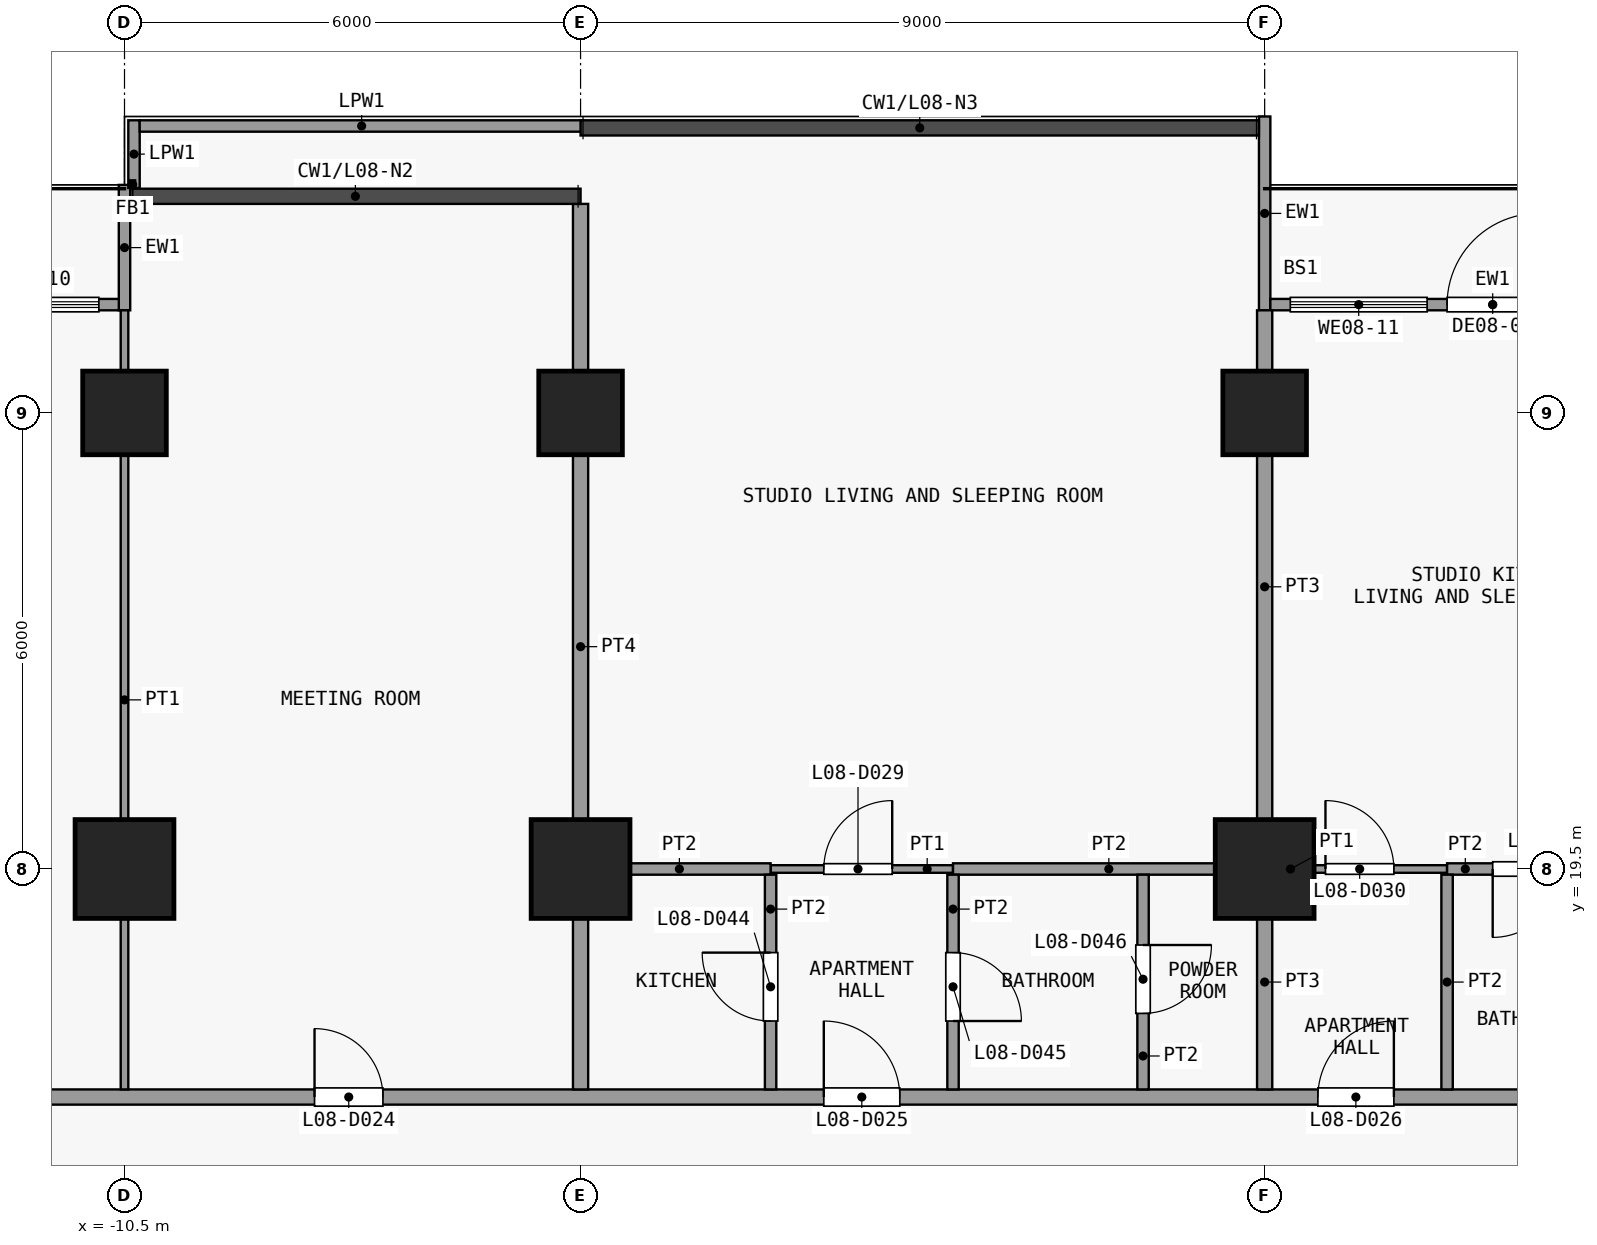
"""IFC4 building model, lengths in metres.
Left out: names, types, materials, properties, quantities, classifications, styles, units other than length and angle.
Written with IfcOpenShell. Run it as: python <this file> out.ifc"""

import sys

from ifc_helpers import new_model, si_unit, direction, frame, frame_2d, origin, origin_2d, place, context, subcontext, project, spatial, rectangle, extrude, element, fill, save


model = new_model("IFC4")
c1 = context("Model", 3, precision=1e-05, world=origin(), true_north=direction((0.0, 1.0)))
c2 = subcontext(c1, "Body", "Model", "MODEL_VIEW")
j1 = project(units=[si_unit("LENGTHUNIT", "METRE"), si_unit("PLANEANGLEUNIT", "RADIAN")], contexts=[c1])
p1 = place(None, origin())
s1 = spatial("IfcSite", under=j1, at=p1, CompositionType="ELEMENT")
p2 = place(p1, origin())
s2 = spatial("IfcBuilding", under=s1, at=p2, CompositionType="ELEMENT")
p3 = place(p2, frame((0.0, 0.0, 39.7)))
s3 = spatial("IfcBuildingStorey", under=s2, at=p3, CompositionType="ELEMENT", Elevation=39.7)
p4 = place(p3, frame((-10.5, 19.5, 0.0), z_axis=(0.0, 0.0, 1.0), x_axis=(1.0, 0.0, 0.0)))
e1 = element("IfcColumn", 1, at=p4, inside=s3, PredefinedType="COLUMN", context=c2, shape_type="SweptSolid", body=[
    extrude(rectangle(XDim=1.3, YDim=1.3, at=origin_2d()), origin(), (0.0, 0.0, 1.0), 3.6),
])
p5 = place(p3, frame((-10.5, 25.5, 0.0), z_axis=(0.0, 0.0, 1.0), x_axis=(1.0, 0.0, 0.0)))
e2 = element("IfcColumn", 2, at=p5, inside=s3, PredefinedType="COLUMN", context=c2, shape_type="SweptSolid", body=[
    extrude(rectangle(XDim=1.1, YDim=1.1, at=origin_2d()), origin(), (0.0, 0.0, 1.0), 3.6),
])
p6 = place(p3, frame((-4.5, 19.5, 0.0), z_axis=(0.0, 0.0, 1.0), x_axis=(1.0, 0.0, 0.0)))
e3 = element("IfcColumn", 3, at=p6, inside=s3, PredefinedType="COLUMN", context=c2, shape_type="SweptSolid", body=[
    extrude(rectangle(XDim=1.3, YDim=1.3, at=origin_2d()), origin(), (0.0, 0.0, 1.0), 3.6),
])
p7 = place(p3, frame((-4.5, 25.5, 0.0), z_axis=(0.0, 0.0, 1.0), x_axis=(1.0, 0.0, 0.0)))
e4 = element("IfcColumn", 4, at=p7, inside=s3, PredefinedType="COLUMN", context=c2, shape_type="SweptSolid", body=[
    extrude(rectangle(XDim=1.1, YDim=1.1, at=origin_2d()), origin(), (0.0, 0.0, 1.0), 3.6),
])
p8 = place(p3, frame((4.5, 19.5, 0.0), z_axis=(0.0, 0.0, 1.0), x_axis=(1.0, 0.0, 0.0)))
e5 = element("IfcColumn", 5, at=p8, inside=s3, PredefinedType="COLUMN", context=c2, shape_type="SweptSolid", body=[
    extrude(rectangle(XDim=1.3, YDim=1.3, at=origin_2d()), origin(), (0.0, 0.0, 1.0), 3.6),
])
p9 = place(p3, frame((4.5, 25.5, 0.0), z_axis=(0.0, 0.0, 1.0), x_axis=(1.0, 0.0, 0.0)))
e6 = element("IfcColumn", 6, at=p9, inside=s3, PredefinedType="COLUMN", context=c2, shape_type="SweptSolid", body=[
    extrude(rectangle(XDim=1.1, YDim=1.1, at=origin_2d()), origin(), (0.0, 0.0, 1.0), 3.6),
])
p10 = place(p3, frame((-10.5, 26.85, 0.0), z_axis=(0.0, 0.0, 1.0), x_axis=(0.0, 1.0, 0.0)))
e7 = element("IfcWall", 7, at=p10, inside=s3, PredefinedType="SOLIDWALL", context=c2, shape_type="SweptSolid", body=[
    extrude(rectangle(XDim=1.65, YDim=0.15, at=frame_2d((0.825, 0.0))), origin(), (0.0, 0.0, 1.0), 3.3),
])
p11 = place(p3, frame((-16.425, 26.925, 0.0), z_axis=(0.0, 0.0, 1.0), x_axis=(1.0, 0.0, 0.0)))
e8 = element("IfcWall", 8, at=p11, inside=s3, PredefinedType="SOLIDWALL", context=c2, shape_type="SweptSolid", body=[
    extrude(rectangle(XDim=5.85, YDim=0.15, at=frame_2d((2.925, 0.0))), origin(), (0.0, 0.0, 1.0), 3.3),
])
p12 = place(p11, frame((2.325, 0.0, 0.0)))
e9 = element("IfcOpeningElement", 9, at=p12, cuts=e8, PredefinedType="OPENING", context=c2, shape_type="SweptSolid", body=[
    extrude(rectangle(XDim=1.2, YDim=2.4, at=frame_2d((0.6, 1.2))), frame((0.0, 0.085, 0.0), z_axis=(0.0, -1.0, 0.0), x_axis=(1.0, 0.0, 0.0)), (0.0, 0.0, 1.0), 0.17),
])
p13 = place(p11, frame((0.262, 0.0, 0.9)))
e10 = element("IfcOpeningElement", 10, at=p13, cuts=e8, PredefinedType="OPENING", context=c2, shape_type="SweptSolid", body=[
    extrude(rectangle(XDim=1.8, YDim=2.1, at=frame_2d((0.9, 1.05))), frame((0.0, 0.085, 0.0), z_axis=(0.0, -1.0, 0.0), x_axis=(1.0, 0.0, 0.0)), (0.0, 0.0, 1.0), 0.17),
])
p14 = place(p11, frame((3.788, 0.0, 0.9)))
e11 = element("IfcOpeningElement", 11, at=p14, cuts=e8, PredefinedType="OPENING", context=c2, shape_type="SweptSolid", body=[
    extrude(rectangle(XDim=1.8, YDim=2.1, at=frame_2d((0.9, 1.05))), frame((0.0, 0.085, 0.0), z_axis=(0.0, -1.0, 0.0), x_axis=(1.0, 0.0, 0.0)), (0.0, 0.0, 1.0), 0.17),
])
p15 = place(p3, frame((4.5, 26.85, 0.0), z_axis=(0.0, 0.0, 1.0), x_axis=(0.0, 1.0, 0.0)))
e12 = element("IfcWall", 12, at=p15, inside=s3, PredefinedType="SOLIDWALL", context=c2, shape_type="SweptSolid", body=[
    extrude(rectangle(XDim=2.55, YDim=0.15, at=frame_2d((1.275, 0.0))), origin(), (0.0, 0.0, 1.0), 3.3),
])
p16 = place(p3, frame((4.575, 26.925, 0.0), z_axis=(0.0, 0.0, 1.0), x_axis=(1.0, 0.0, 0.0)))
e13 = element("IfcWall", 13, at=p16, inside=s3, PredefinedType="SOLIDWALL", context=c2, shape_type="SweptSolid", body=[
    extrude(rectangle(XDim=5.85, YDim=0.15, at=frame_2d((2.925, 0.0))), origin(), (0.0, 0.0, 1.0), 3.3),
])
p17 = place(p16, frame((2.325, 0.0, 0.0)))
e14 = element("IfcOpeningElement", 14, at=p17, cuts=e13, PredefinedType="OPENING", context=c2, shape_type="SweptSolid", body=[
    extrude(rectangle(XDim=1.2, YDim=2.4, at=frame_2d((0.6, 1.2))), frame((0.0, 0.085, 0.0), z_axis=(0.0, -1.0, 0.0), x_axis=(1.0, 0.0, 0.0)), (0.0, 0.0, 1.0), 0.17),
])
p18 = place(p16, frame((0.262, 0.0, 0.9)))
e15 = element("IfcOpeningElement", 15, at=p18, cuts=e13, PredefinedType="OPENING", context=c2, shape_type="SweptSolid", body=[
    extrude(rectangle(XDim=1.8, YDim=2.1, at=frame_2d((0.9, 1.05))), frame((0.0, 0.085, 0.0), z_axis=(0.0, -1.0, 0.0), x_axis=(1.0, 0.0, 0.0)), (0.0, 0.0, 1.0), 0.17),
])
p19 = place(p16, frame((3.788, 0.0, 0.9)))
e16 = element("IfcOpeningElement", 16, at=p19, cuts=e13, PredefinedType="OPENING", context=c2, shape_type="SweptSolid", body=[
    extrude(rectangle(XDim=1.8, YDim=2.1, at=frame_2d((0.9, 1.05))), frame((0.0, 0.085, 0.0), z_axis=(0.0, -1.0, 0.0), x_axis=(1.0, 0.0, 0.0)), (0.0, 0.0, 1.0), 0.17),
])
p20 = place(p3, frame((-10.375, 28.46, 0.0), z_axis=(0.0, 0.0, 1.0), x_axis=(0.0, 1.0, 0.0)))
e17 = element("IfcWall", 17, at=p20, inside=s3, PredefinedType="PARAPET", context=c2, shape_type="SweptSolid", body=[
    extrude(rectangle(XDim=0.89, YDim=0.15, at=frame_2d((0.445, 0.0))), origin(), (0.0, 0.0, 1.0), 1.15),
])
p21 = place(p3, frame((-10.3, 29.275, 0.0), z_axis=(0.0, 0.0, 1.0), x_axis=(1.0, 0.0, 0.0)))
e18 = element("IfcWall", 18, at=p21, inside=s3, PredefinedType="PARAPET", context=c2, shape_type="SweptSolid", body=[
    extrude(rectangle(XDim=5.84, YDim=0.15, at=frame_2d((2.92, 0.0))), origin(), (0.0, 0.0, 1.0), 1.15),
])
p22 = place(p3, frame((-25.35, 16.5, 0.0), z_axis=(0.0, 0.0, 1.0), x_axis=(1.0, 0.0, 0.0)))
e19 = element("IfcWall", 19, at=p22, inside=s3, PredefinedType="PARTITIONING", context=c2, shape_type="SweptSolid", body=[
    extrude(rectangle(XDim=50.7, YDim=0.2, at=frame_2d((25.35, 0.0))), origin(), (0.0, 0.0, 1.0), 3.3),
])
p23 = place(p22, frame((4.55, 0.0, 0.0)))
e20 = element("IfcOpeningElement", 20, at=p23, cuts=e19, PredefinedType="OPENING", context=c2, shape_type="SweptSolid", body=[
    extrude(rectangle(XDim=1.0, YDim=2.1, at=frame_2d((0.5, 1.05))), frame((0.0, 0.11, 0.0), z_axis=(0.0, -1.0, 0.0), x_axis=(1.0, 0.0, 0.0)), (0.0, 0.0, 1.0), 0.22),
])
p24 = place(p22, frame((11.35, 0.0, 0.0)))
e21 = element("IfcOpeningElement", 21, at=p24, cuts=e19, PredefinedType="OPENING", context=c2, shape_type="SweptSolid", body=[
    extrude(rectangle(XDim=0.9, YDim=2.1, at=frame_2d((0.45, 1.05))), frame((0.0, 0.11, 0.0), z_axis=(0.0, -1.0, 0.0), x_axis=(1.0, 0.0, 0.0)), (0.0, 0.0, 1.0), 0.22),
])
p25 = place(p22, frame((17.35, 0.0, 0.0)))
e22 = element("IfcOpeningElement", 22, at=p25, cuts=e19, PredefinedType="OPENING", context=c2, shape_type="SweptSolid", body=[
    extrude(rectangle(XDim=0.9, YDim=2.1, at=frame_2d((0.45, 1.05))), frame((0.0, 0.11, 0.0), z_axis=(0.0, -1.0, 0.0), x_axis=(1.0, 0.0, 0.0)), (0.0, 0.0, 1.0), 0.22),
])
p26 = place(p22, frame((24.05, 0.0, 0.0)))
e23 = element("IfcOpeningElement", 23, at=p26, cuts=e19, PredefinedType="OPENING", context=c2, shape_type="SweptSolid", body=[
    extrude(rectangle(XDim=1.0, YDim=2.1, at=frame_2d((0.5, 1.05))), frame((0.0, 0.11, 0.0), z_axis=(0.0, -1.0, 0.0), x_axis=(1.0, 0.0, 0.0)), (0.0, 0.0, 1.0), 0.22),
])
p27 = place(p22, frame((30.55, 0.0, 0.0)))
e24 = element("IfcOpeningElement", 24, at=p27, cuts=e19, PredefinedType="OPENING", context=c2, shape_type="SweptSolid", body=[
    extrude(rectangle(XDim=1.0, YDim=2.1, at=frame_2d((0.5, 1.05))), frame((0.0, 0.11, 0.0), z_axis=(0.0, -1.0, 0.0), x_axis=(1.0, 0.0, 0.0)), (0.0, 0.0, 1.0), 0.22),
])
p28 = place(p22, frame((42.55, 0.0, 0.0)))
e25 = element("IfcOpeningElement", 25, at=p28, cuts=e19, PredefinedType="OPENING", context=c2, shape_type="SweptSolid", body=[
    extrude(rectangle(XDim=1.0, YDim=2.1, at=frame_2d((0.5, 1.05))), frame((0.0, 0.11, 0.0), z_axis=(0.0, -1.0, 0.0), x_axis=(1.0, 0.0, 0.0)), (0.0, 0.0, 1.0), 0.22),
])
p29 = place(p3, frame((-2.0, 19.5, 0.0), z_axis=(0.0, 0.0, 1.0), x_axis=(1.0, 0.0, 0.0)))
e26 = element("IfcWall", 26, at=p29, inside=s3, PredefinedType="PARTITIONING", context=c2, shape_type="SweptSolid", body=[
    extrude(rectangle(XDim=2.4, YDim=0.1, at=frame_2d((1.2, 0.0))), origin(), (0.0, 0.0, 1.0), 3.3),
])
p30 = place(p29, frame((0.7, 0.0, 0.0)))
e27 = element("IfcOpeningElement", 27, at=p30, cuts=e26, PredefinedType="OPENING", context=c2, shape_type="SweptSolid", body=[
    extrude(rectangle(XDim=0.9, YDim=2.1, at=frame_2d((0.45, 1.05))), frame((0.0, 0.06, 0.0), z_axis=(0.0, -1.0, 0.0), x_axis=(1.0, 0.0, 0.0)), (0.0, 0.0, 1.0), 0.12),
])
p31 = place(p3, frame((4.5, 19.5, 0.0), z_axis=(0.0, 0.0, 1.0), x_axis=(1.0, 0.0, 0.0)))
e28 = element("IfcWall", 28, at=p31, inside=s3, PredefinedType="PARTITIONING", context=c2, shape_type="SweptSolid", body=[
    extrude(rectangle(XDim=2.4, YDim=0.1, at=frame_2d((1.2, 0.0))), origin(), (0.0, 0.0, 1.0), 3.3),
])
p32 = place(p31, frame((0.8, 0.0, 0.0)))
e29 = element("IfcOpeningElement", 29, at=p32, cuts=e28, PredefinedType="OPENING", context=c2, shape_type="SweptSolid", body=[
    extrude(rectangle(XDim=0.9, YDim=2.1, at=frame_2d((0.45, 1.05))), frame((0.0, 0.06, 0.0), z_axis=(0.0, -1.0, 0.0), x_axis=(1.0, 0.0, 0.0)), (0.0, 0.0, 1.0), 0.12),
])
p33 = place(p3, frame((-4.4, 19.5, 0.0), z_axis=(0.0, 0.0, 1.0), x_axis=(1.0, 0.0, 0.0)))
e30 = element("IfcWall", 30, at=p33, inside=s3, PredefinedType="PARTITIONING", context=c2, shape_type="SweptSolid", body=[
    extrude(rectangle(XDim=2.4, YDim=0.15, at=frame_2d((1.2, 0.0))), origin(), (0.0, 0.0, 1.0), 3.3),
])
p34 = place(p3, frame((0.4, 19.5, 0.0), z_axis=(0.0, 0.0, 1.0), x_axis=(1.0, 0.0, 0.0)))
e31 = element("IfcWall", 31, at=p34, inside=s3, PredefinedType="PARTITIONING", context=c2, shape_type="SweptSolid", body=[
    extrude(rectangle(XDim=4.1, YDim=0.15, at=frame_2d((2.05, 0.0))), origin(), (0.0, 0.0, 1.0), 3.3),
])
p35 = place(p3, frame((6.9, 19.5, 0.0), z_axis=(0.0, 0.0, 1.0), x_axis=(1.0, 0.0, 0.0)))
e32 = element("IfcWall", 32, at=p35, inside=s3, PredefinedType="PARTITIONING", context=c2, shape_type="SweptSolid", body=[
    extrude(rectangle(XDim=2.075, YDim=0.15, at=frame_2d((1.038, 0.0))), origin(), (0.0, 0.0, 1.0), 3.3),
])
p36 = place(p35, frame((0.6, 0.0, 0.0)))
e33 = element("IfcOpeningElement", 33, at=p36, cuts=e32, PredefinedType="OPENING", context=c2, shape_type="SweptSolid", body=[
    extrude(rectangle(XDim=0.9, YDim=2.1, at=frame_2d((0.45, 1.05))), frame((0.0, 0.085, 0.0), z_axis=(0.0, -1.0, 0.0), x_axis=(1.0, 0.0, 0.0)), (0.0, 0.0, 1.0), 0.17),
])
p37 = place(p3, frame((-10.5, 16.6, 0.0), z_axis=(0.0, 0.0, 1.0), x_axis=(0.0, 1.0, 0.0)))
e34 = element("IfcWall", 34, at=p37, inside=s3, PredefinedType="PARTITIONING", context=c2, shape_type="SweptSolid", body=[
    extrude(rectangle(XDim=10.25, YDim=0.1, at=frame_2d((5.125, 0.0))), origin(), (0.0, 0.0, 1.0), 3.3),
])
p38 = place(p3, frame((-4.5, 16.6, 0.0), z_axis=(0.0, 0.0, 1.0), x_axis=(0.0, 1.0, 0.0)))
e35 = element("IfcWall", 35, at=p38, inside=s3, PredefinedType="PARTITIONING", context=c2, shape_type="SweptSolid", body=[
    extrude(rectangle(XDim=11.65, YDim=0.2, at=frame_2d((5.825, 0.0))), origin(), (0.0, 0.0, 1.0), 3.3),
])
p39 = place(p3, frame((-2.0, 16.6, 0.0), z_axis=(0.0, 0.0, 1.0), x_axis=(0.0, 1.0, 0.0)))
e36 = element("IfcWall", 36, at=p39, inside=s3, PredefinedType="PARTITIONING", context=c2, shape_type="SweptSolid", body=[
    extrude(rectangle(XDim=2.825, YDim=0.15, at=frame_2d((1.413, 0.0))), origin(), (0.0, 0.0, 1.0), 3.3),
])
p40 = place(p39, frame((0.9, 0.0, 0.0)))
e37 = element("IfcOpeningElement", 37, at=p40, cuts=e36, PredefinedType="OPENING", context=c2, shape_type="SweptSolid", body=[
    extrude(rectangle(XDim=0.9, YDim=2.1, at=frame_2d((0.45, 1.05))), frame((0.0, 0.085, 0.0), z_axis=(0.0, -1.0, 0.0), x_axis=(1.0, 0.0, 0.0)), (0.0, 0.0, 1.0), 0.17),
])
p41 = place(p3, frame((0.4, 16.6, 0.0), z_axis=(0.0, 0.0, 1.0), x_axis=(0.0, 1.0, 0.0)))
e38 = element("IfcWall", 38, at=p41, inside=s3, PredefinedType="PARTITIONING", context=c2, shape_type="SweptSolid", body=[
    extrude(rectangle(XDim=2.825, YDim=0.15, at=frame_2d((1.413, 0.0))), origin(), (0.0, 0.0, 1.0), 3.3),
])
p42 = place(p41, frame((0.9, 0.0, 0.0)))
e39 = element("IfcOpeningElement", 39, at=p42, cuts=e38, PredefinedType="OPENING", context=c2, shape_type="SweptSolid", body=[
    extrude(rectangle(XDim=0.9, YDim=2.1, at=frame_2d((0.45, 1.05))), frame((0.0, 0.085, 0.0), z_axis=(0.0, -1.0, 0.0), x_axis=(1.0, 0.0, 0.0)), (0.0, 0.0, 1.0), 0.17),
])
p43 = place(p3, frame((2.9, 16.6, 0.0), z_axis=(0.0, 0.0, 1.0), x_axis=(0.0, 1.0, 0.0)))
e40 = element("IfcWall", 40, at=p43, inside=s3, PredefinedType="PARTITIONING", context=c2, shape_type="SweptSolid", body=[
    extrude(rectangle(XDim=2.825, YDim=0.15, at=frame_2d((1.413, 0.0))), origin(), (0.0, 0.0, 1.0), 3.3),
])
p44 = place(p43, frame((1.0, 0.0, 0.0)))
e41 = element("IfcOpeningElement", 41, at=p44, cuts=e40, PredefinedType="OPENING", context=c2, shape_type="SweptSolid", body=[
    extrude(rectangle(XDim=0.9, YDim=2.1, at=frame_2d((0.45, 1.05))), frame((0.0, 0.085, 0.0), z_axis=(0.0, -1.0, 0.0), x_axis=(1.0, 0.0, 0.0)), (0.0, 0.0, 1.0), 0.17),
])
p45 = place(p3, frame((4.5, 16.6, 0.0), z_axis=(0.0, 0.0, 1.0), x_axis=(0.0, 1.0, 0.0)))
e42 = element("IfcWall", 42, at=p45, inside=s3, PredefinedType="PARTITIONING", context=c2, shape_type="SweptSolid", body=[
    extrude(rectangle(XDim=2.825, YDim=0.2, at=frame_2d((1.413, 0.0))), origin(), (0.0, 0.0, 1.0), 3.3),
])
p46 = place(p3, frame((4.5, 19.575, 0.0), z_axis=(0.0, 0.0, 1.0), x_axis=(0.0, 1.0, 0.0)))
e43 = element("IfcWall", 43, at=p46, inside=s3, PredefinedType="PARTITIONING", context=c2, shape_type="SweptSolid", body=[
    extrude(rectangle(XDim=7.275, YDim=0.2, at=frame_2d((3.638, 0.0))), origin(), (0.0, 0.0, 1.0), 3.3),
])
p47 = place(p3, frame((6.9, 16.6, 0.0), z_axis=(0.0, 0.0, 1.0), x_axis=(0.0, 1.0, 0.0)))
e44 = element("IfcWall", 44, at=p47, inside=s3, PredefinedType="PARTITIONING", context=c2, shape_type="SweptSolid", body=[
    extrude(rectangle(XDim=2.825, YDim=0.15, at=frame_2d((1.413, 0.0))), origin(), (0.0, 0.0, 1.0), 3.3),
])
p48 = place(p14, origin())
e45 = element("IfcWindow", 45, at=p48, inside=s3, PartitioningType="SINGLE_PANEL", PredefinedType="WINDOW", context=c2, shape_type="SweptSolid", body=[
    extrude(rectangle(XDim=1.8, YDim=2.1, at=frame_2d((0.9, 1.05))), frame((0.0, 0.03, 0.0), z_axis=(0.0, -1.0, 0.0), x_axis=(1.0, 0.0, 0.0)), (0.0, 0.0, 1.0), 0.06),
])
fill(e11, e45)
p49 = place(p17, origin())
e46 = element("IfcDoor", 46, at=p49, inside=s3, OperationType="SINGLE_SWING_RIGHT", PredefinedType="DOOR", context=c2, shape_type="SweptSolid", body=[
    extrude(rectangle(XDim=1.2, YDim=2.4, at=frame_2d((0.6, 1.2))), frame((0.0, 0.025, 0.0), z_axis=(0.0, -1.0, 0.0), x_axis=(1.0, 0.0, 0.0)), (0.0, 0.0, 1.0), 0.05),
])
fill(e14, e46)
p50 = place(p18, origin())
e47 = element("IfcWindow", 47, at=p50, inside=s3, PartitioningType="SINGLE_PANEL", PredefinedType="WINDOW", context=c2, shape_type="SweptSolid", body=[
    extrude(rectangle(XDim=1.8, YDim=2.1, at=frame_2d((0.9, 1.05))), frame((0.0, 0.03, 0.0), z_axis=(0.0, -1.0, 0.0), x_axis=(1.0, 0.0, 0.0)), (0.0, 0.0, 1.0), 0.06),
])
fill(e15, e47)
p51 = place(p25, origin())
e48 = element("IfcDoor", 48, at=p51, inside=s3, OperationType="SINGLE_SWING_RIGHT", PredefinedType="DOOR", context=c2, shape_type="SweptSolid", body=[
    extrude(rectangle(XDim=0.9, YDim=2.1, at=frame_2d((0.45, 1.05))), frame((0.0, 0.025, 0.0), z_axis=(0.0, -1.0, 0.0), x_axis=(1.0, 0.0, 0.0)), (0.0, 0.0, 1.0), 0.05),
])
fill(e22, e48)
p52 = place(p26, origin())
e49 = element("IfcDoor", 49, at=p52, inside=s3, OperationType="SINGLE_SWING_RIGHT", PredefinedType="DOOR", context=c2, shape_type="SweptSolid", body=[
    extrude(rectangle(XDim=1.0, YDim=2.1, at=frame_2d((0.5, 1.05))), frame((0.0, 0.025, 0.0), z_axis=(0.0, -1.0, 0.0), x_axis=(1.0, 0.0, 0.0)), (0.0, 0.0, 1.0), 0.05),
])
fill(e23, e49)
p53 = place(p27, origin())
e50 = element("IfcDoor", 50, at=p53, inside=s3, OperationType="SINGLE_SWING_LEFT", PredefinedType="DOOR", context=c2, shape_type="SweptSolid", body=[
    extrude(rectangle(XDim=1.0, YDim=2.1, at=frame_2d((0.5, 1.05))), frame((0.0, 0.025, 0.0), z_axis=(0.0, -1.0, 0.0), x_axis=(1.0, 0.0, 0.0)), (0.0, 0.0, 1.0), 0.05),
])
fill(e24, e50)
p54 = place(p30, origin())
e51 = element("IfcDoor", 51, at=p54, inside=s3, OperationType="SINGLE_SWING_LEFT", PredefinedType="DOOR", context=c2, shape_type="SweptSolid", body=[
    extrude(rectangle(XDim=0.9, YDim=2.1, at=frame_2d((0.45, 1.05))), frame((0.0, 0.025, 0.0), z_axis=(0.0, -1.0, 0.0), x_axis=(1.0, 0.0, 0.0)), (0.0, 0.0, 1.0), 0.05),
])
fill(e27, e51)
p55 = place(p32, origin())
e52 = element("IfcDoor", 52, at=p55, inside=s3, OperationType="SINGLE_SWING_RIGHT", PredefinedType="DOOR", context=c2, shape_type="SweptSolid", body=[
    extrude(rectangle(XDim=0.9, YDim=2.1, at=frame_2d((0.45, 1.05))), frame((0.0, 0.025, 0.0), z_axis=(0.0, -1.0, 0.0), x_axis=(1.0, 0.0, 0.0)), (0.0, 0.0, 1.0), 0.05),
])
fill(e29, e52)
p56 = place(p36, origin())
e53 = element("IfcDoor", 53, at=p56, inside=s3, OperationType="SINGLE_SWING_LEFT", PredefinedType="DOOR", context=c2, shape_type="SweptSolid", body=[
    extrude(rectangle(XDim=0.9, YDim=2.1, at=frame_2d((0.45, 1.05))), frame((0.0, 0.025, 0.0), z_axis=(0.0, -1.0, 0.0), x_axis=(1.0, 0.0, 0.0)), (0.0, 0.0, 1.0), 0.05),
])
fill(e33, e53)
p57 = place(p40, origin())
e54 = element("IfcDoor", 54, at=p57, inside=s3, OperationType="SINGLE_SWING_LEFT", PredefinedType="DOOR", context=c2, shape_type="SweptSolid", body=[
    extrude(rectangle(XDim=0.9, YDim=2.1, at=frame_2d((0.45, 1.05))), frame((0.0, 0.025, 0.0), z_axis=(0.0, -1.0, 0.0), x_axis=(1.0, 0.0, 0.0)), (0.0, 0.0, 1.0), 0.05),
])
fill(e37, e54)
p58 = place(p42, origin())
e55 = element("IfcDoor", 55, at=p58, inside=s3, OperationType="SINGLE_SWING_LEFT", PredefinedType="DOOR", context=c2, shape_type="SweptSolid", body=[
    extrude(rectangle(XDim=0.9, YDim=2.1, at=frame_2d((0.45, 1.05))), frame((0.0, 0.025, 0.0), z_axis=(0.0, -1.0, 0.0), x_axis=(1.0, 0.0, 0.0)), (0.0, 0.0, 1.0), 0.05),
])
fill(e39, e55)
p59 = place(p44, origin())
e56 = element("IfcDoor", 56, at=p59, inside=s3, OperationType="SINGLE_SWING_RIGHT", PredefinedType="DOOR", context=c2, shape_type="SweptSolid", body=[
    extrude(rectangle(XDim=0.9, YDim=2.1, at=frame_2d((0.45, 1.05))), frame((0.0, 0.025, 0.0), z_axis=(0.0, -1.0, 0.0), x_axis=(1.0, 0.0, 0.0)), (0.0, 0.0, 1.0), 0.05),
])
fill(e41, e56)
save(model, sys.argv[1])
